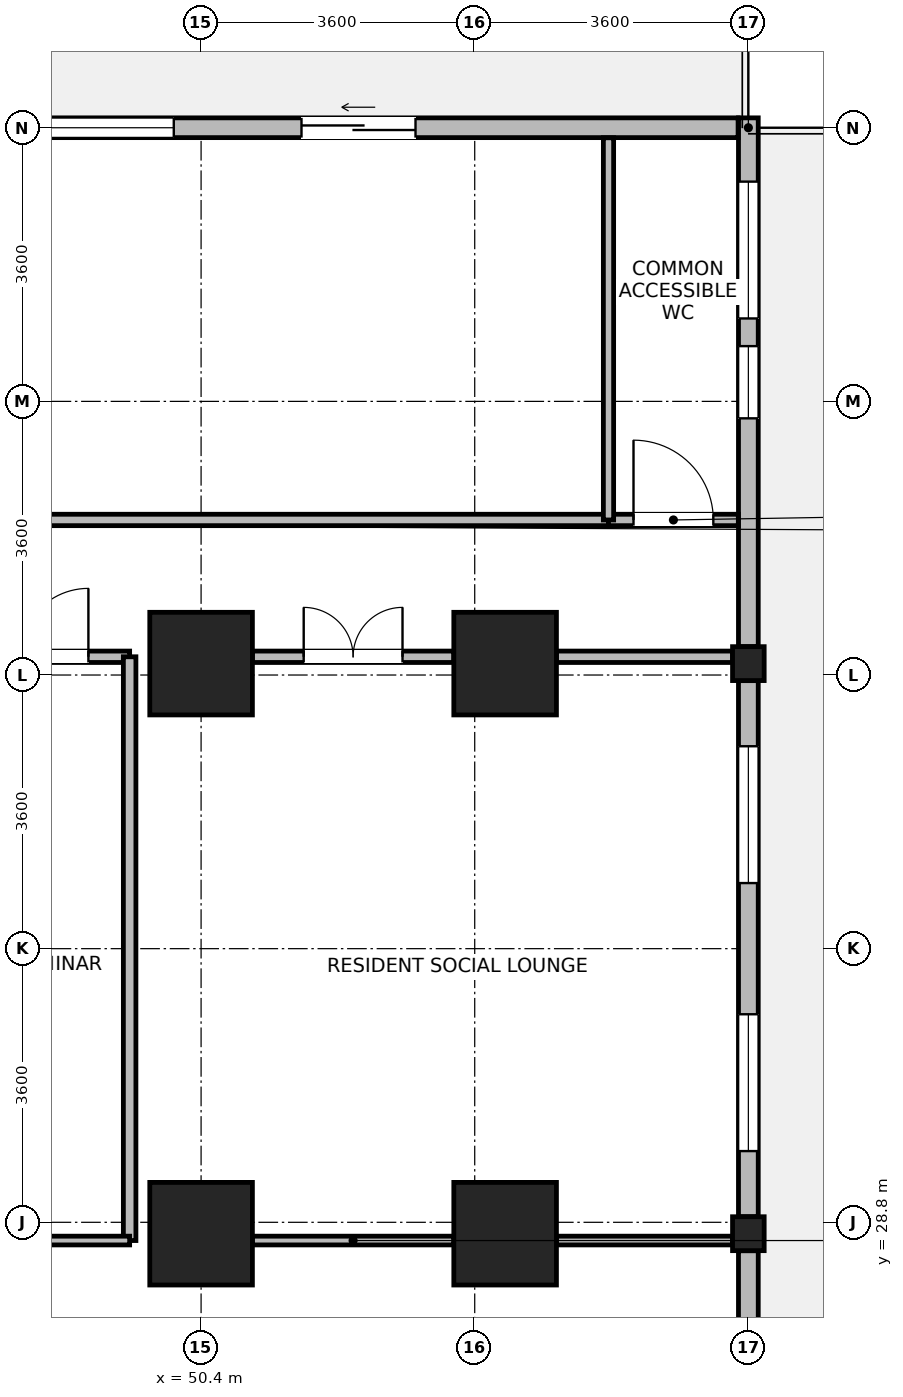
"""IFC4 building model, lengths in metres.
Left out: names, types, materials, properties, quantities, classifications, styles, units other than length and angle.
Written with IfcOpenShell. Run it as: python <this file> out.ifc"""

import sys

from ifc_helpers import new_model, si_unit, direction, frame, frame_2d, origin, origin_2d, place, context, subcontext, project, spatial, rectangle, i_section, extrude, source, transform, mapped, element, fill, save


model = new_model("IFC4")
c1 = context("Model", 3, precision=1e-05, world=origin(), true_north=direction((0.0, 1.0)))
c2 = subcontext(c1, "Body", "Model", "MODEL_VIEW")
j1 = project(units=[si_unit("LENGTHUNIT", "METRE"), si_unit("PLANEANGLEUNIT", "RADIAN")], contexts=[c1])
p1 = place(None, origin())
s1 = spatial("IfcSite", under=j1, at=p1, CompositionType="ELEMENT")
p2 = place(p1, origin())
s2 = spatial("IfcBuilding", under=s1, at=p2, CompositionType="ELEMENT")
p3 = place(p2, frame((0.0, 0.0, 36.4)))
s3 = spatial("IfcBuildingStorey", under=s2, at=p3, CompositionType="ELEMENT", Elevation=36.4)
m1 = source(origin(), c2, "Body", "SweptSolid", [
    extrude(rectangle(XDim=1.35, YDim=1.35, at=origin_2d()), origin(), (0.0, 0.0, 1.0), 3.7),
])
for number, where, z_axis, x_axis in (
    (1, (50.4, 28.65, 0.0), (0.0, 0.0, 1.0), (1.0, 0.0, 0.0)),
    (2, (50.4, 36.15, 0.0), (0.0, 0.0, 1.0), (1.0, 0.0, 0.0)),
    (3, (54.4, 28.65, 0.0), (0.0, 0.0, 1.0), (1.0, 0.0, 0.0)),
    (4, (54.4, 36.15, 0.0), (0.0, 0.0, 1.0), (1.0, 0.0, 0.0)),
):
    element("IfcColumn", number, at=place(p3, frame(where, z_axis=z_axis, x_axis=x_axis)), inside=s3, PredefinedType="COLUMN", context=c2, shape_type="MappedRepresentation", body=[
        mapped(m1, transform((0.0, 0.0, 0.0), x_axis=(1.0, 0.0, 0.0), y_axis=(0.0, 1.0, 0.0), z_axis=(0.0, 0.0, 1.0), scale=1.0)),
    ])
m2 = source(origin(), c2, "Body", "SweptSolid", [
    extrude(i_section(OverallWidth=0.416, OverallDepth=0.446, WebThickness=0.029, FlangeThickness=0.04, FilletRadius=0.015, at=origin_2d()), origin(), (0.0, 0.0, 1.0), 3.7),
])
for number, where, z_axis, x_axis in (
    (5, (57.6, 28.65, 0.0), (0.0, 0.0, 1.0), (1.0, 0.0, 0.0)),
    (6, (57.6, 36.15, 0.0), (0.0, 0.0, 1.0), (1.0, 0.0, 0.0)),
):
    element("IfcColumn", number, at=place(p3, frame(where, z_axis=z_axis, x_axis=x_axis)), inside=s3, PredefinedType="COLUMN", context=c2, shape_type="MappedRepresentation", body=[
        mapped(m2, transform((0.0, 0.0, 0.0), x_axis=(1.0, 0.0, 0.0), y_axis=(0.0, 1.0, 0.0), z_axis=(0.0, 0.0, 1.0), scale=1.0)),
    ])
p4 = place(p3, frame((57.6, 28.426, 0.0), z_axis=(0.0, 0.0, 1.0), x_axis=(0.0, -1.0, 0.0)))
e7 = element("IfcWall", 7, at=p4, inside=s3, PredefinedType="STANDARD", context=c2, shape_type="SweptSolid", body=[
    extrude(rectangle(XDim=6.602, YDim=0.26, at=frame_2d((3.301, 0.0))), origin(), (0.0, 0.0, 1.0), 2.93),
])
p5 = place(p4, frame((4.052, 0.0, 0.85)))
e8 = element("IfcOpeningElement", 8, at=p5, cuts=e7, PredefinedType="OPENING", context=c2, shape_type="SweptSolid", body=[
    extrude(rectangle(XDim=1.8, YDim=1.85, at=frame_2d((0.9, 0.925))), frame((0.0, 0.14, 0.0), z_axis=(0.0, -1.0, 0.0), x_axis=(1.0, 0.0, 0.0)), (0.0, 0.0, 1.0), 0.28),
])
p6 = place(p4, frame((2.298, 0.0, 0.85)))
e9 = element("IfcOpeningElement", 9, at=p6, cuts=e7, PredefinedType="OPENING", context=c2, shape_type="SweptSolid", body=[
    extrude(rectangle(XDim=0.95, YDim=1.75, at=frame_2d((0.475, 0.875))), frame((0.0, 0.14, 0.0), z_axis=(0.0, -1.0, 0.0), x_axis=(1.0, 0.0, 0.0)), (0.0, 0.0, 1.0), 0.28),
])
p7 = place(p3, frame((57.6, 35.926, 0.0), z_axis=(0.0, 0.0, 1.0), x_axis=(0.0, -1.0, 0.0)))
e10 = element("IfcWall", 10, at=p7, inside=s3, PredefinedType="STANDARD", context=c2, shape_type="SweptSolid", body=[
    extrude(rectangle(XDim=7.052, YDim=0.26, at=frame_2d((3.526, 0.0))), origin(), (0.0, 0.0, 1.0), 2.93),
])
p8 = place(p7, frame((0.863, 0.0, 0.85)))
e11 = element("IfcOpeningElement", 11, at=p8, cuts=e10, PredefinedType="OPENING", context=c2, shape_type="SweptSolid", body=[
    extrude(rectangle(XDim=1.8, YDim=1.85, at=frame_2d((0.9, 0.925))), frame((0.0, 0.14, 0.0), z_axis=(0.0, -1.0, 0.0), x_axis=(1.0, 0.0, 0.0)), (0.0, 0.0, 1.0), 0.28),
])
p9 = place(p7, frame((4.389, 0.0, 0.85)))
e12 = element("IfcOpeningElement", 12, at=p9, cuts=e10, PredefinedType="OPENING", context=c2, shape_type="SweptSolid", body=[
    extrude(rectangle(XDim=1.8, YDim=1.85, at=frame_2d((0.9, 0.925))), frame((0.0, 0.14, 0.0), z_axis=(0.0, -1.0, 0.0), x_axis=(1.0, 0.0, 0.0)), (0.0, 0.0, 1.0), 0.28),
])
p10 = place(p3, frame((57.6, 43.33, 0.0), z_axis=(0.0, 0.0, 1.0), x_axis=(0.0, -1.0, 0.0)))
e13 = element("IfcWall", 13, at=p10, inside=s3, PredefinedType="STANDARD", context=c2, shape_type="SweptSolid", body=[
    extrude(rectangle(XDim=6.956, YDim=0.26, at=frame_2d((3.478, 0.0))), origin(), (0.0, 0.0, 1.0), 3.43),
])
p11 = place(p10, frame((0.839, 0.0, 0.85)))
e14 = element("IfcOpeningElement", 14, at=p11, cuts=e13, PredefinedType="OPENING", context=c2, shape_type="SweptSolid", body=[
    extrude(rectangle(XDim=1.8, YDim=1.85, at=frame_2d((0.9, 0.925))), frame((0.0, 0.14, 0.0), z_axis=(0.0, -1.0, 0.0), x_axis=(1.0, 0.0, 0.0)), (0.0, 0.0, 1.0), 0.28),
])
p12 = place(p10, frame((3.003, 0.0, 0.85)))
e15 = element("IfcOpeningElement", 15, at=p12, cuts=e13, PredefinedType="OPENING", context=c2, shape_type="SweptSolid", body=[
    extrude(rectangle(XDim=0.95, YDim=1.75, at=frame_2d((0.475, 0.875))), frame((0.0, 0.14, 0.0), z_axis=(0.0, -1.0, 0.0), x_axis=(1.0, 0.0, 0.0)), (0.0, 0.0, 1.0), 0.28),
])
p13 = place(p3, frame((47.476, 43.2, 0.0), z_axis=(0.0, 0.0, 1.0), x_axis=(1.0, 0.0, 0.0)))
e16 = element("IfcWall", 16, at=p13, inside=s3, PredefinedType="STANDARD", context=c2, shape_type="SweptSolid", body=[
    extrude(rectangle(XDim=9.989, YDim=0.26, at=frame_2d((4.995, 0.0))), origin(), (0.0, 0.0, 1.0), 3.43),
])
p14 = place(p13, frame((4.245, 0.0, 0.0)))
e17 = element("IfcOpeningElement", 17, at=p14, cuts=e16, PredefinedType="OPENING", context=c2, shape_type="SweptSolid", body=[
    extrude(rectangle(XDim=1.5, YDim=2.15, at=frame_2d((0.75, 1.075))), frame((0.0, 0.14, 0.0), z_axis=(0.0, -1.0, 0.0), x_axis=(1.0, 0.0, 0.0)), (0.0, 0.0, 1.0), 0.28),
])
p15 = place(p13, frame((0.765, 0.0, 0.85)))
e18 = element("IfcOpeningElement", 18, at=p15, cuts=e16, PredefinedType="OPENING", context=c2, shape_type="SweptSolid", body=[
    extrude(rectangle(XDim=1.8, YDim=1.85, at=frame_2d((0.9, 0.925))), frame((0.0, 0.14, 0.0), z_axis=(0.0, -1.0, 0.0), x_axis=(1.0, 0.0, 0.0)), (0.0, 0.0, 1.0), 0.28),
])
p16 = place(p3, frame((38.7, 38.04, 0.0), z_axis=(0.0, 0.0, 1.0), x_axis=(1.0, 0.0, 0.0)))
e19 = element("IfcWall", 19, at=p16, inside=s3, PredefinedType="PARTITIONING", context=c2, shape_type="SweptSolid", body=[
    extrude(rectangle(XDim=17.06, YDim=0.15, at=frame_2d((8.53, 0.0))), origin(), (0.0, 0.0, 1.0), 3.43),
])
p17 = place(p16, frame((6.374, 0.0, 0.0)))
e20 = element("IfcOpeningElement", 20, at=p17, cuts=e19, PredefinedType="OPENING", context=c2, shape_type="SweptSolid", body=[
    extrude(rectangle(XDim=0.9, YDim=2.08, at=frame_2d((0.45, 1.04))), frame((0.0, 0.085, 0.0), z_axis=(0.0, -1.0, 0.0), x_axis=(1.0, 0.0, 0.0)), (0.0, 0.0, 1.0), 0.17),
])
p18 = place(p3, frame((51.075, 36.24, 0.0), z_axis=(0.0, 0.0, 1.0), x_axis=(1.0, 0.0, 0.0)))
e21 = element("IfcWall", 21, at=p18, inside=s3, PredefinedType="PARTITIONING", context=c2, shape_type="SweptSolid", body=[
    extrude(rectangle(XDim=2.65, YDim=0.15, at=frame_2d((1.325, 0.0))), origin(), (0.0, 0.0, 1.0), 2.78),
])
p19 = place(p18, frame((0.675, 0.0, 0.0)))
e22 = element("IfcOpeningElement", 22, at=p19, cuts=e21, PredefinedType="OPENING", context=c2, shape_type="SweptSolid", body=[
    extrude(rectangle(XDim=1.3, YDim=2.12, at=frame_2d((0.65, 1.06))), frame((0.0, 0.085, 0.0), z_axis=(0.0, -1.0, 0.0), x_axis=(1.0, 0.0, 0.0)), (0.0, 0.0, 1.0), 0.17),
])
p20 = place(p3, frame((55.075, 36.24, 0.0), z_axis=(0.0, 0.0, 1.0), x_axis=(1.0, 0.0, 0.0)))
e23 = element("IfcWall", 23, at=p20, inside=s3, PredefinedType="PARTITIONING", context=c2, shape_type="SweptSolid", body=[
    extrude(rectangle(XDim=2.317, YDim=0.15, at=frame_2d((1.159, 0.0))), origin(), (0.0, 0.0, 1.0), 2.78),
])
p21 = place(p3, frame((47.475, 36.24, 0.0), z_axis=(0.0, 0.0, 1.0), x_axis=(1.0, 0.0, 0.0)))
e24 = element("IfcWall", 24, at=p21, inside=s3, PredefinedType="PARTITIONING", context=c2, shape_type="SweptSolid", body=[
    extrude(rectangle(XDim=1.985, YDim=0.15, at=frame_2d((0.992, 0.0))), origin(), (0.0, 0.0, 1.0), 2.78),
])
p22 = place(p21, frame((0.542, 0.0, 0.0)))
e25 = element("IfcOpeningElement", 25, at=p22, cuts=e24, PredefinedType="OPENING", context=c2, shape_type="SweptSolid", body=[
    extrude(rectangle(XDim=0.9, YDim=2.08, at=frame_2d((0.45, 1.04))), frame((0.0, 0.085, 0.0), z_axis=(0.0, -1.0, 0.0), x_axis=(1.0, 0.0, 0.0)), (0.0, 0.0, 1.0), 0.17),
])
p23 = place(p3, frame((55.76, 38.04, 0.0), z_axis=(0.0, 0.0, 1.0), x_axis=(1.0, 0.0, 0.0)))
e26 = element("IfcWall", 26, at=p23, inside=s3, PredefinedType="PARTITIONING", context=c2, shape_type="SweptSolid", body=[
    extrude(rectangle(XDim=1.708, YDim=0.15, at=frame_2d((0.854, 0.0))), origin(), (0.0, 0.0, 1.0), 3.43),
])
p24 = place(p23, frame((0.329, 0.0, 0.0)))
e27 = element("IfcOpeningElement", 27, at=p24, cuts=e26, PredefinedType="OPENING", context=c2, shape_type="SweptSolid", body=[
    extrude(rectangle(XDim=1.05, YDim=2.12, at=frame_2d((0.525, 1.06))), frame((0.0, 0.085, 0.0), z_axis=(0.0, -1.0, 0.0), x_axis=(1.0, 0.0, 0.0)), (0.0, 0.0, 1.0), 0.17),
])
p25 = place(p3, frame((51.075, 28.56, 0.0), z_axis=(0.0, 0.0, 1.0), x_axis=(1.0, 0.0, 0.0)))
e28 = element("IfcWall", 28, at=p25, inside=s3, PredefinedType="PARTITIONING", context=c2, shape_type="SweptSolid", body=[
    extrude(rectangle(XDim=2.65, YDim=0.115, at=frame_2d((1.325, 0.0))), origin(), (0.0, 0.0, 1.0), 2.78),
])
p26 = place(p3, frame((55.075, 28.56, 0.0), z_axis=(0.0, 0.0, 1.0), x_axis=(1.0, 0.0, 0.0)))
e29 = element("IfcWall", 29, at=p26, inside=s3, PredefinedType="PARTITIONING", context=c2, shape_type="SweptSolid", body=[
    extrude(rectangle(XDim=2.317, YDim=0.115, at=frame_2d((1.159, 0.0))), origin(), (0.0, 0.0, 1.0), 2.78),
])
p27 = place(p3, frame((49.46, 28.56, 0.0), z_axis=(0.0, 0.0, 1.0), x_axis=(0.0, 1.0, 0.0)))
e30 = element("IfcWall", 30, at=p27, inside=s3, PredefinedType="PARTITIONING", context=c2, shape_type="SweptSolid", body=[
    extrude(rectangle(XDim=7.68, YDim=0.165, at=frame_2d((3.84, 0.0))), origin(), (0.0, 0.0, 1.0), 3.43),
])
p28 = place(p3, frame((55.76, 38.04, 0.0), z_axis=(0.0, 0.0, 1.0), x_axis=(0.0, 1.0, 0.0)))
e31 = element("IfcWall", 31, at=p28, inside=s3, PredefinedType="PARTITIONING", context=c2, shape_type="SweptSolid", body=[
    extrude(rectangle(XDim=5.028, YDim=0.135, at=frame_2d((2.514, 0.0))), origin(), (0.0, 0.0, 1.0), 3.43),
])
p29 = place(p3, frame((47.475, 28.56, 0.0), z_axis=(0.0, 0.0, 1.0), x_axis=(1.0, 0.0, 0.0)))
e32 = element("IfcWall", 32, at=p29, inside=s3, PredefinedType="PARTITIONING", context=c2, shape_type="SweptSolid", body=[
    extrude(rectangle(XDim=1.985, YDim=0.115, at=frame_2d((0.992, 0.0))), origin(), (0.0, 0.0, 1.0), 2.78),
])
p30 = place(p8, origin())
e33 = element("IfcWindow", 33, at=p30, inside=s3, PartitioningType="SINGLE_PANEL", PredefinedType="WINDOW", context=c2, shape_type="SweptSolid", body=[
    extrude(rectangle(XDim=1.8, YDim=1.85, at=frame_2d((0.9, 0.925))), frame((0.0, 0.03, 0.0), z_axis=(0.0, -1.0, 0.0), x_axis=(1.0, 0.0, 0.0)), (0.0, 0.0, 1.0), 0.06),
])
fill(e11, e33)
p31 = place(p9, origin())
e34 = element("IfcWindow", 34, at=p31, inside=s3, PartitioningType="SINGLE_PANEL", PredefinedType="WINDOW", context=c2, shape_type="SweptSolid", body=[
    extrude(rectangle(XDim=1.8, YDim=1.85, at=frame_2d((0.9, 0.925))), frame((0.0, 0.03, 0.0), z_axis=(0.0, -1.0, 0.0), x_axis=(1.0, 0.0, 0.0)), (0.0, 0.0, 1.0), 0.06),
])
fill(e12, e34)
p32 = place(p11, origin())
e35 = element("IfcWindow", 35, at=p32, inside=s3, PartitioningType="SINGLE_PANEL", PredefinedType="WINDOW", context=c2, shape_type="SweptSolid", body=[
    extrude(rectangle(XDim=1.8, YDim=1.85, at=frame_2d((0.9, 0.925))), frame((0.0, 0.03, 0.0), z_axis=(0.0, -1.0, 0.0), x_axis=(1.0, 0.0, 0.0)), (0.0, 0.0, 1.0), 0.06),
])
fill(e14, e35)
p33 = place(p12, origin())
e36 = element("IfcWindow", 36, at=p33, inside=s3, PartitioningType="SINGLE_PANEL", PredefinedType="WINDOW", context=c2, shape_type="SweptSolid", body=[
    extrude(rectangle(XDim=0.95, YDim=1.75, at=frame_2d((0.475, 0.875))), frame((0.0, 0.03, 0.0), z_axis=(0.0, -1.0, 0.0), x_axis=(1.0, 0.0, 0.0)), (0.0, 0.0, 1.0), 0.06),
])
fill(e15, e36)
p34 = place(p14, origin())
e37 = element("IfcDoor", 37, at=p34, inside=s3, OperationType="SLIDING_TO_LEFT", PredefinedType="DOOR", context=c2, shape_type="SweptSolid", body=[
    extrude(rectangle(XDim=1.5, YDim=2.15, at=frame_2d((0.75, 1.075))), frame((0.0, 0.025, 0.0), z_axis=(0.0, -1.0, 0.0), x_axis=(1.0, 0.0, 0.0)), (0.0, 0.0, 1.0), 0.05),
])
fill(e17, e37)
p35 = place(p15, origin())
e38 = element("IfcWindow", 38, at=p35, inside=s3, PartitioningType="SINGLE_PANEL", PredefinedType="WINDOW", context=c2, shape_type="SweptSolid", body=[
    extrude(rectangle(XDim=1.8, YDim=1.85, at=frame_2d((0.9, 0.925))), frame((0.0, 0.03, 0.0), z_axis=(0.0, -1.0, 0.0), x_axis=(1.0, 0.0, 0.0)), (0.0, 0.0, 1.0), 0.06),
])
fill(e18, e38)
p36 = place(p19, origin())
e39 = element("IfcDoor", 39, at=p36, inside=s3, OperationType="DOUBLE_DOOR_SINGLE_SWING", PredefinedType="DOOR", context=c2, shape_type="SweptSolid", body=[
    extrude(rectangle(XDim=1.3, YDim=2.12, at=frame_2d((0.65, 1.06))), frame((0.0, 0.025, 0.0), z_axis=(0.0, -1.0, 0.0), x_axis=(1.0, 0.0, 0.0)), (0.0, 0.0, 1.0), 0.05),
])
fill(e22, e39)
p37 = place(p22, origin())
e40 = element("IfcDoor", 40, at=p37, inside=s3, OperationType="SINGLE_SWING_RIGHT", PredefinedType="DOOR", context=c2, shape_type="SweptSolid", body=[
    extrude(rectangle(XDim=0.9, YDim=2.08, at=frame_2d((0.45, 1.04))), frame((0.0, 0.025, 0.0), z_axis=(0.0, -1.0, 0.0), x_axis=(1.0, 0.0, 0.0)), (0.0, 0.0, 1.0), 0.05),
])
fill(e25, e40)
p38 = place(p24, origin())
e41 = element("IfcDoor", 41, at=p38, inside=s3, OperationType="SINGLE_SWING_LEFT", PredefinedType="DOOR", context=c2, shape_type="SweptSolid", body=[
    extrude(rectangle(XDim=1.05, YDim=2.12, at=frame_2d((0.525, 1.06))), frame((0.0, 0.025, 0.0), z_axis=(0.0, -1.0, 0.0), x_axis=(1.0, 0.0, 0.0)), (0.0, 0.0, 1.0), 0.05),
])
fill(e27, e41)
save(model, sys.argv[1])
